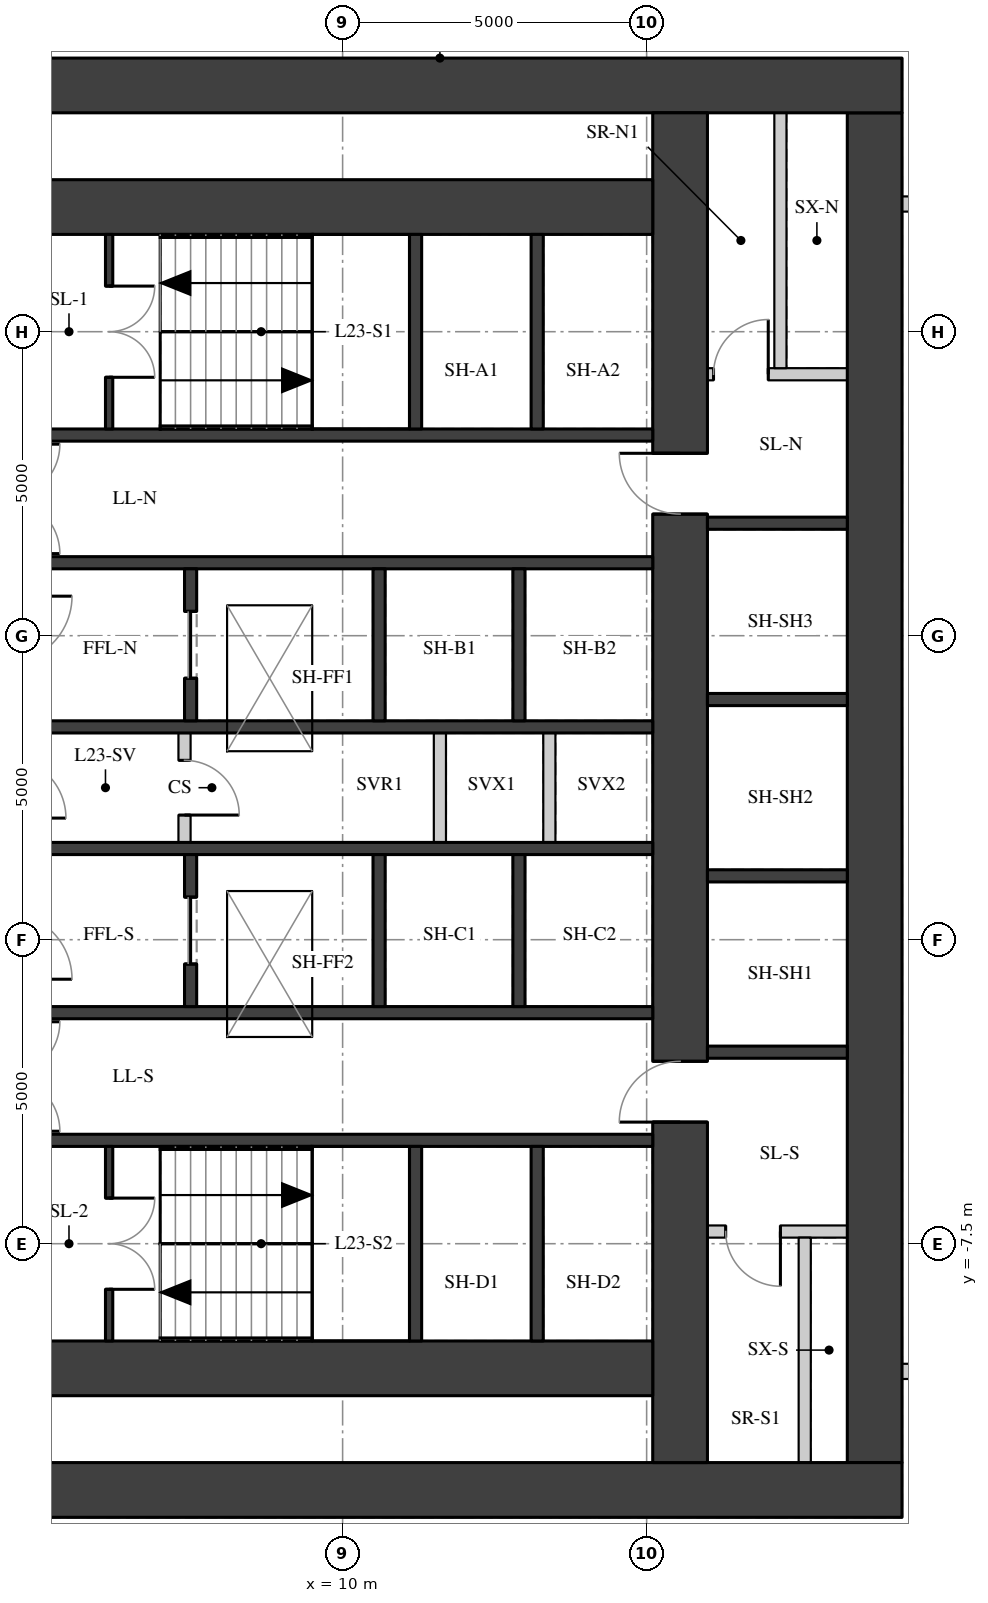
"""IFC4 building model, lengths in metres.
Left out: names, types, materials, properties, quantities, classifications, styles, units other than length and angle.
Written with IfcOpenShell. Run it as: python <this file> out.ifc"""

import sys

from ifc_helpers import new_model, si_unit, direction, frame, frame_2d, origin, place, context, subcontext, project, spatial, rectangle, extrude, element, fill, save


model = new_model("IFC4")
c1 = context("Model", 3, precision=1e-05, world=origin(), true_north=direction((0.0, 1.0)))
c2 = subcontext(c1, "Body", "Model", "MODEL_VIEW")
j1 = project(units=[si_unit("LENGTHUNIT", "METRE"), si_unit("PLANEANGLEUNIT", "RADIAN")], contexts=[c1])
p1 = place(None, origin())
s1 = spatial("IfcSite", under=j1, at=p1, CompositionType="ELEMENT")
p2 = place(p1, origin())
s2 = spatial("IfcBuilding", under=s1, at=p2, CompositionType="ELEMENT")
p3 = place(p2, frame((0.0, 0.0, 84.4)))
s3 = spatial("IfcBuildingStorey", under=s2, at=p3, CompositionType="ELEMENT", Elevation=84.4)
p4 = place(p3, frame((18.75, -11.1, 0.0), z_axis=(0.0, 0.0, 1.0), x_axis=(0.0, 1.0, 0.0)))
e1 = element("IfcWall", 1, at=p4, inside=s3, PredefinedType="SHEAR", context=c2, shape_type="SweptSolid", body=[
    extrude(rectangle(XDim=22.2, YDim=0.9, at=frame_2d((11.1, 0.0))), origin(), (0.0, 0.0, 1.0), 4.22),
])
for number, where, z_axis, x_axis in (
    (2, (4.0, 11.55, 0.0), (0.0, 0.0, 1.0), (1.0, 0.0, 0.0)),
    (3, (4.0, -11.55, 0.0), (0.0, 0.0, 1.0), (1.0, 0.0, 0.0)),
):
    element("IfcWall", number, at=place(p3, frame(where, z_axis=z_axis, x_axis=x_axis)), inside=s3, PredefinedType="SHEAR", context=c2, shape_type="SweptSolid", body=[
        extrude(rectangle(XDim=15.2, YDim=0.9, at=frame_2d((7.6, 0.0))), origin(), (0.0, 0.0, 1.0), 4.22),
    ])
p5 = place(p3, frame((15.55, -11.1, 0.0), z_axis=(0.0, 0.0, 1.0), x_axis=(0.0, 1.0, 0.0)))
e4 = element("IfcWall", 4, at=p5, inside=s3, PredefinedType="SHEAR", context=c2, shape_type="SweptSolid", body=[
    extrude(rectangle(XDim=22.2, YDim=0.9, at=frame_2d((11.1, 0.0))), origin(), (0.0, 0.0, 1.0), 4.22),
])
p6 = place(p5, frame((15.6, 0.0, 0.0)))
e5 = element("IfcOpeningElement", 5, at=p6, cuts=e4, PredefinedType="OPENING", context=c2, shape_type="SweptSolid", body=[
    extrude(rectangle(XDim=1.0, YDim=2.1, at=frame_2d((0.5, 1.05))), frame((0.0, 0.46, 0.0), z_axis=(0.0, -1.0, 0.0), x_axis=(1.0, 0.0, 0.0)), (0.0, 0.0, 1.0), 0.92),
])
p7 = place(p5, frame((5.6, 0.0, 0.0)))
e6 = element("IfcOpeningElement", 6, at=p7, cuts=e4, PredefinedType="OPENING", context=c2, shape_type="SweptSolid", body=[
    extrude(rectangle(XDim=1.0, YDim=2.1, at=frame_2d((0.5, 1.05))), frame((0.0, 0.46, 0.0), z_axis=(0.0, -1.0, 0.0), x_axis=(1.0, 0.0, 0.0)), (0.0, 0.0, 1.0), 0.92),
])
for number, where, z_axis, x_axis in (
    (7, (4.9, 9.55, 0.0), (0.0, 0.0, 1.0), (1.0, 0.0, 0.0)),
    (8, (4.9, -9.55, 0.0), (0.0, 0.0, 1.0), (1.0, 0.0, 0.0)),
):
    element("IfcWall", number, at=place(p3, frame(where, z_axis=z_axis, x_axis=x_axis)), inside=s3, PredefinedType="SHEAR", context=c2, shape_type="SweptSolid", body=[
        extrude(rectangle(XDim=10.2, YDim=0.9, at=frame_2d((5.1, 0.0))), origin(), (0.0, 0.0, 1.0), 4.22),
    ])
for number, where, z_axis, x_axis in (
    (9, (4.9, 5.8, 0.0), (0.0, 0.0, 1.0), (1.0, 0.0, 0.0)),
    (10, (4.9, 3.7, 0.0), (0.0, 0.0, 1.0), (1.0, 0.0, 0.0)),
    (11, (4.9, 1.0, 0.0), (0.0, 0.0, 1.0), (1.0, 0.0, 0.0)),
    (12, (4.9, -1.0, 0.0), (0.0, 0.0, 1.0), (1.0, 0.0, 0.0)),
    (13, (4.9, -3.7, 0.0), (0.0, 0.0, 1.0), (1.0, 0.0, 0.0)),
    (14, (4.9, -5.8, 0.0), (0.0, 0.0, 1.0), (1.0, 0.0, 0.0)),
):
    element("IfcWall", number, at=place(p3, frame(where, z_axis=z_axis, x_axis=x_axis)), inside=s3, PredefinedType="SHEAR", context=c2, shape_type="SweptSolid", body=[
        extrude(rectangle(XDim=10.2, YDim=0.2, at=frame_2d((5.1, 0.0))), origin(), (0.0, 0.0, 1.0), 4.22),
    ])
for number, where, z_axis, x_axis in (
    (15, (11.2, 5.9, 0.0), (0.0, 0.0, 1.0), (0.0, 1.0, 0.0)),
    (16, (11.2, -9.1, 0.0), (0.0, 0.0, 1.0), (0.0, 1.0, 0.0)),
    (17, (13.2, 5.9, 0.0), (0.0, 0.0, 1.0), (0.0, 1.0, 0.0)),
    (18, (13.2, -9.1, 0.0), (0.0, 0.0, 1.0), (0.0, 1.0, 0.0)),
):
    element("IfcWall", number, at=place(p3, frame(where, z_axis=z_axis, x_axis=x_axis)), inside=s3, PredefinedType="SHEAR", context=c2, shape_type="SweptSolid", body=[
        extrude(rectangle(XDim=3.2, YDim=0.2, at=frame_2d((1.6, 0.0))), origin(), (0.0, 0.0, 1.0), 4.22),
    ])
p8 = place(p3, frame((7.5, 1.1, 0.0), z_axis=(0.0, 0.0, 1.0), x_axis=(0.0, 1.0, 0.0)))
e19 = element("IfcWall", 19, at=p8, inside=s3, PredefinedType="SHEAR", context=c2, shape_type="SweptSolid", body=[
    extrude(rectangle(XDim=2.5, YDim=0.2, at=frame_2d((1.25, 0.0))), origin(), (0.0, 0.0, 1.0), 4.22),
])
p9 = place(p8, frame((0.7, 0.0, 0.0)))
e20 = element("IfcOpeningElement", 20, at=p9, cuts=e19, PredefinedType="OPENING", context=c2, shape_type="SweptSolid", body=[
    extrude(rectangle(XDim=1.1, YDim=2.1, at=frame_2d((0.55, 1.05))), frame((0.0, 0.11, 0.0), z_axis=(0.0, -1.0, 0.0), x_axis=(1.0, 0.0, 0.0)), (0.0, 0.0, 1.0), 0.22),
])
p10 = place(p3, frame((7.5, -3.6, 0.0), z_axis=(0.0, 0.0, 1.0), x_axis=(0.0, 1.0, 0.0)))
e21 = element("IfcWall", 21, at=p10, inside=s3, PredefinedType="SHEAR", context=c2, shape_type="SweptSolid", body=[
    extrude(rectangle(XDim=2.5, YDim=0.2, at=frame_2d((1.25, 0.0))), origin(), (0.0, 0.0, 1.0), 4.22),
])
p11 = place(p10, frame((0.7, 0.0, 0.0)))
e22 = element("IfcOpeningElement", 22, at=p11, cuts=e21, PredefinedType="OPENING", context=c2, shape_type="SweptSolid", body=[
    extrude(rectangle(XDim=1.1, YDim=2.1, at=frame_2d((0.55, 1.05))), frame((0.0, 0.11, 0.0), z_axis=(0.0, -1.0, 0.0), x_axis=(1.0, 0.0, 0.0)), (0.0, 0.0, 1.0), 0.22),
])
for number, where, z_axis, x_axis in (
    (23, (10.6, 1.1, 0.0), (0.0, 0.0, 1.0), (0.0, 1.0, 0.0)),
    (24, (10.6, -3.6, 0.0), (0.0, 0.0, 1.0), (0.0, 1.0, 0.0)),
    (25, (12.9, 1.1, 0.0), (0.0, 0.0, 1.0), (0.0, 1.0, 0.0)),
    (26, (12.9, -3.6, 0.0), (0.0, 0.0, 1.0), (0.0, 1.0, 0.0)),
):
    element("IfcWall", number, at=place(p3, frame(where, z_axis=z_axis, x_axis=x_axis)), inside=s3, PredefinedType="SHEAR", context=c2, shape_type="SweptSolid", body=[
        extrude(rectangle(XDim=2.5, YDim=0.2, at=frame_2d((1.25, 0.0))), origin(), (0.0, 0.0, 1.0), 4.22),
    ])
p12 = place(p3, frame((6.16, 5.9, 0.0), z_axis=(0.0, 0.0, 1.0), x_axis=(0.0, 1.0, 0.0)))
e27 = element("IfcWall", 27, at=p12, inside=s3, PredefinedType="SHEAR", context=c2, shape_type="SweptSolid", body=[
    extrude(rectangle(XDim=3.2, YDim=0.12, at=frame_2d((1.6, 0.0))), origin(), (0.0, 0.0, 1.0), 4.22),
])
p13 = place(p12, frame((0.85, 0.0, 0.0)))
e28 = element("IfcOpeningElement", 28, at=p13, cuts=e27, PredefinedType="OPENING", context=c2, shape_type="SweptSolid", body=[
    extrude(rectangle(XDim=1.5, YDim=2.1, at=frame_2d((0.75, 1.05))), frame((0.0, 0.07, 0.0), z_axis=(0.0, -1.0, 0.0), x_axis=(1.0, 0.0, 0.0)), (0.0, 0.0, 1.0), 0.14),
])
p14 = place(p3, frame((6.16, -9.1, 0.0), z_axis=(0.0, 0.0, 1.0), x_axis=(0.0, 1.0, 0.0)))
e29 = element("IfcWall", 29, at=p14, inside=s3, PredefinedType="SHEAR", context=c2, shape_type="SweptSolid", body=[
    extrude(rectangle(XDim=3.2, YDim=0.12, at=frame_2d((1.6, 0.0))), origin(), (0.0, 0.0, 1.0), 4.22),
])
p15 = place(p14, frame((0.85, 0.0, 0.0)))
e30 = element("IfcOpeningElement", 30, at=p15, cuts=e29, PredefinedType="OPENING", context=c2, shape_type="SweptSolid", body=[
    extrude(rectangle(XDim=1.5, YDim=2.1, at=frame_2d((0.75, 1.05))), frame((0.0, 0.07, 0.0), z_axis=(0.0, -1.0, 0.0), x_axis=(1.0, 0.0, 0.0)), (0.0, 0.0, 1.0), 0.14),
])
p16 = place(p3, frame((7.4, -0.9, 0.0), z_axis=(0.0, 0.0, 1.0), x_axis=(0.0, 1.0, 0.0)))
e31 = element("IfcWall", 31, at=p16, inside=s3, PredefinedType="PARTITIONING", context=c2, shape_type="SweptSolid", body=[
    extrude(rectangle(XDim=1.8, YDim=0.2, at=frame_2d((0.9, 0.0))), origin(), (0.0, 0.0, 1.0), 4.22),
])
p17 = place(p16, frame((0.45, 0.0, 0.0)))
e32 = element("IfcOpeningElement", 32, at=p17, cuts=e31, PredefinedType="OPENING", context=c2, shape_type="SweptSolid", body=[
    extrude(rectangle(XDim=0.9, YDim=2.1, at=frame_2d((0.45, 1.05))), frame((0.0, 0.11, 0.0), z_axis=(0.0, -1.0, 0.0), x_axis=(1.0, 0.0, 0.0)), (0.0, 0.0, 1.0), 0.22),
])
for number, where, z_axis, x_axis in (
    (33, (11.6, -0.9, 0.0), (0.0, 0.0, 1.0), (0.0, 1.0, 0.0)),
    (34, (13.4, -0.9, 0.0), (0.0, 0.0, 1.0), (0.0, 1.0, 0.0)),
):
    element("IfcWall", number, at=place(p3, frame(where, z_axis=z_axis, x_axis=x_axis)), inside=s3, PredefinedType="PARTITIONING", context=c2, shape_type="SweptSolid", body=[
        extrude(rectangle(XDim=1.8, YDim=0.2, at=frame_2d((0.9, 0.0))), origin(), (0.0, 0.0, 1.0), 4.22),
    ])
for number, where, z_axis, x_axis in (
    (35, (16.0, -4.35, 0.0), (0.0, 0.0, 1.0), (1.0, 0.0, 0.0)),
    (36, (16.0, -1.45, 0.0), (0.0, 0.0, 1.0), (1.0, 0.0, 0.0)),
    (37, (16.0, 1.45, 0.0), (0.0, 0.0, 1.0), (1.0, 0.0, 0.0)),
    (38, (16.0, 4.35, 0.0), (0.0, 0.0, 1.0), (1.0, 0.0, 0.0)),
):
    element("IfcWall", number, at=place(p3, frame(where, z_axis=z_axis, x_axis=x_axis)), inside=s3, PredefinedType="SHEAR", context=c2, shape_type="SweptSolid", body=[
        extrude(rectangle(XDim=2.3, YDim=0.2, at=frame_2d((1.15, 0.0))), origin(), (0.0, 0.0, 1.0), 4.22),
    ])
p18 = place(p3, frame((16.0, 6.8, 0.0), z_axis=(0.0, 0.0, 1.0), x_axis=(1.0, 0.0, 0.0)))
e39 = element("IfcWall", 39, at=p18, inside=s3, PredefinedType="PARTITIONING", context=c2, shape_type="SweptSolid", body=[
    extrude(rectangle(XDim=2.3, YDim=0.2, at=frame_2d((1.15, 0.0))), origin(), (0.0, 0.0, 1.0), 4.22),
])
p19 = place(p18, frame((0.1, 0.0, 0.0)))
e40 = element("IfcOpeningElement", 40, at=p19, cuts=e39, PredefinedType="OPENING", context=c2, shape_type="SweptSolid", body=[
    extrude(rectangle(XDim=0.9, YDim=2.1, at=frame_2d((0.45, 1.05))), frame((0.0, 0.11, 0.0), z_axis=(0.0, -1.0, 0.0), x_axis=(1.0, 0.0, 0.0)), (0.0, 0.0, 1.0), 0.22),
])
p20 = place(p3, frame((17.2, 6.9, 0.0), z_axis=(0.0, 0.0, 1.0), x_axis=(0.0, 1.0, 0.0)))
e41 = element("IfcWall", 41, at=p20, inside=s3, PredefinedType="PARTITIONING", context=c2, shape_type="SweptSolid", body=[
    extrude(rectangle(XDim=4.2, YDim=0.2, at=frame_2d((2.1, 0.0))), origin(), (0.0, 0.0, 1.0), 4.22),
])
p21 = place(p3, frame((16.0, -7.3, 0.0), z_axis=(0.0, 0.0, 1.0), x_axis=(1.0, 0.0, 0.0)))
e42 = element("IfcWall", 42, at=p21, inside=s3, PredefinedType="PARTITIONING", context=c2, shape_type="SweptSolid", body=[
    extrude(rectangle(XDim=2.3, YDim=0.2, at=frame_2d((1.15, 0.0))), origin(), (0.0, 0.0, 1.0), 4.22),
])
p22 = place(p21, frame((0.3, 0.0, 0.0)))
e43 = element("IfcOpeningElement", 43, at=p22, cuts=e42, PredefinedType="OPENING", context=c2, shape_type="SweptSolid", body=[
    extrude(rectangle(XDim=0.9, YDim=2.1, at=frame_2d((0.45, 1.05))), frame((0.0, 0.11, 0.0), z_axis=(0.0, -1.0, 0.0), x_axis=(1.0, 0.0, 0.0)), (0.0, 0.0, 1.0), 0.22),
])
p23 = place(p3, frame((17.6, -11.1, 0.0), z_axis=(0.0, 0.0, 1.0), x_axis=(0.0, 1.0, 0.0)))
e44 = element("IfcWall", 44, at=p23, inside=s3, PredefinedType="PARTITIONING", context=c2, shape_type="SweptSolid", body=[
    extrude(rectangle(XDim=3.7, YDim=0.2, at=frame_2d((1.85, 0.0))), origin(), (0.0, 0.0, 1.0), 4.22),
])
p24 = place(p3, frame((19.198, -9.6, 0.0), z_axis=(0.0, 0.0, 1.0), x_axis=(1.0, 0.0, 0.0)))
e45 = element("IfcWall", 45, at=p24, inside=s3, PredefinedType="PARTITIONING", context=c2, shape_type="SweptSolid", body=[
    extrude(rectangle(XDim=5.467, YDim=0.25, at=frame_2d((2.733, 0.0))), origin(), (0.0, 0.0, 1.0), 4.22),
])
p25 = place(p3, frame((19.198, 9.6, 0.0), z_axis=(0.0, 0.0, 1.0), x_axis=(1.0, 0.0, 0.0)))
e46 = element("IfcWall", 46, at=p25, inside=s3, PredefinedType="PARTITIONING", context=c2, shape_type="SweptSolid", body=[
    extrude(rectangle(XDim=5.391, YDim=0.25, at=frame_2d((2.695, 0.0))), origin(), (0.0, 0.0, 1.0), 4.22),
])
p26 = place(p13, origin())
e47 = element("IfcDoor", 47, at=p26, inside=s3, OperationType="DOUBLE_DOOR_SINGLE_SWING", PredefinedType="DOOR", context=c2, shape_type="SweptSolid", body=[
    extrude(rectangle(XDim=1.5, YDim=2.1, at=frame_2d((0.75, 1.05))), frame((0.0, 0.025, 0.0), z_axis=(0.0, -1.0, 0.0), x_axis=(1.0, 0.0, 0.0)), (0.0, 0.0, 1.0), 0.05),
])
fill(e28, e47)
p27 = place(p15, origin())
e48 = element("IfcDoor", 48, at=p27, inside=s3, OperationType="DOUBLE_DOOR_SINGLE_SWING", PredefinedType="DOOR", context=c2, shape_type="SweptSolid", body=[
    extrude(rectangle(XDim=1.5, YDim=2.1, at=frame_2d((0.75, 1.05))), frame((0.0, 0.025, 0.0), z_axis=(0.0, -1.0, 0.0), x_axis=(1.0, 0.0, 0.0)), (0.0, 0.0, 1.0), 0.05),
])
fill(e30, e48)
p28 = place(p9, origin())
e49 = element("IfcDoor", 49, at=p28, inside=s3, OperationType="DOUBLE_DOOR_SLIDING", PredefinedType="DOOR", context=c2, shape_type="SweptSolid", body=[
    extrude(rectangle(XDim=1.1, YDim=2.1, at=frame_2d((0.55, 1.05))), frame((0.0, 0.025, 0.0), z_axis=(0.0, -1.0, 0.0), x_axis=(1.0, 0.0, 0.0)), (0.0, 0.0, 1.0), 0.05),
])
fill(e20, e49)
p29 = place(p11, origin())
e50 = element("IfcDoor", 50, at=p29, inside=s3, OperationType="DOUBLE_DOOR_SLIDING", PredefinedType="DOOR", context=c2, shape_type="SweptSolid", body=[
    extrude(rectangle(XDim=1.1, YDim=2.1, at=frame_2d((0.55, 1.05))), frame((0.0, 0.025, 0.0), z_axis=(0.0, -1.0, 0.0), x_axis=(1.0, 0.0, 0.0)), (0.0, 0.0, 1.0), 0.05),
])
fill(e22, e50)
p30 = place(p17, origin())
e51 = element("IfcDoor", 51, at=p30, inside=s3, OperationType="SINGLE_SWING_RIGHT", PredefinedType="DOOR", context=c2, shape_type="SweptSolid", body=[
    extrude(rectangle(XDim=0.9, YDim=2.1, at=frame_2d((0.45, 1.05))), frame((0.0, 0.025, 0.0), z_axis=(0.0, -1.0, 0.0), x_axis=(1.0, 0.0, 0.0)), (0.0, 0.0, 1.0), 0.05),
])
fill(e32, e51)
p31 = place(p6, origin())
e52 = element("IfcDoor", 52, at=p31, inside=s3, OperationType="SINGLE_SWING_RIGHT", PredefinedType="DOOR", context=c2, shape_type="SweptSolid", body=[
    extrude(rectangle(XDim=1.0, YDim=2.1, at=frame_2d((0.5, 1.05))), frame((0.0, 0.025, 0.0), z_axis=(0.0, -1.0, 0.0), x_axis=(1.0, 0.0, 0.0)), (0.0, 0.0, 1.0), 0.05),
])
fill(e5, e52)
p32 = place(p19, origin())
e53 = element("IfcDoor", 53, at=p32, inside=s3, OperationType="SINGLE_SWING_RIGHT", PredefinedType="DOOR", context=c2, shape_type="SweptSolid", body=[
    extrude(rectangle(XDim=0.9, YDim=2.1, at=frame_2d((0.45, 1.05))), frame((0.0, 0.025, 0.0), z_axis=(0.0, -1.0, 0.0), x_axis=(1.0, 0.0, 0.0)), (0.0, 0.0, 1.0), 0.05),
])
fill(e40, e53)
p33 = place(p7, origin())
e54 = element("IfcDoor", 54, at=p33, inside=s3, OperationType="SINGLE_SWING_LEFT", PredefinedType="DOOR", context=c2, shape_type="SweptSolid", body=[
    extrude(rectangle(XDim=1.0, YDim=2.1, at=frame_2d((0.5, 1.05))), frame((0.0, 0.025, 0.0), z_axis=(0.0, -1.0, 0.0), x_axis=(1.0, 0.0, 0.0)), (0.0, 0.0, 1.0), 0.05),
])
fill(e6, e54)
p34 = place(p22, origin())
e55 = element("IfcDoor", 55, at=p34, inside=s3, OperationType="SINGLE_SWING_LEFT", PredefinedType="DOOR", context=c2, shape_type="SweptSolid", body=[
    extrude(rectangle(XDim=0.9, YDim=2.1, at=frame_2d((0.45, 1.05))), frame((0.0, 0.025, 0.0), z_axis=(0.0, -1.0, 0.0), x_axis=(1.0, 0.0, 0.0)), (0.0, 0.0, 1.0), 0.05),
])
fill(e43, e55)
save(model, sys.argv[1])
